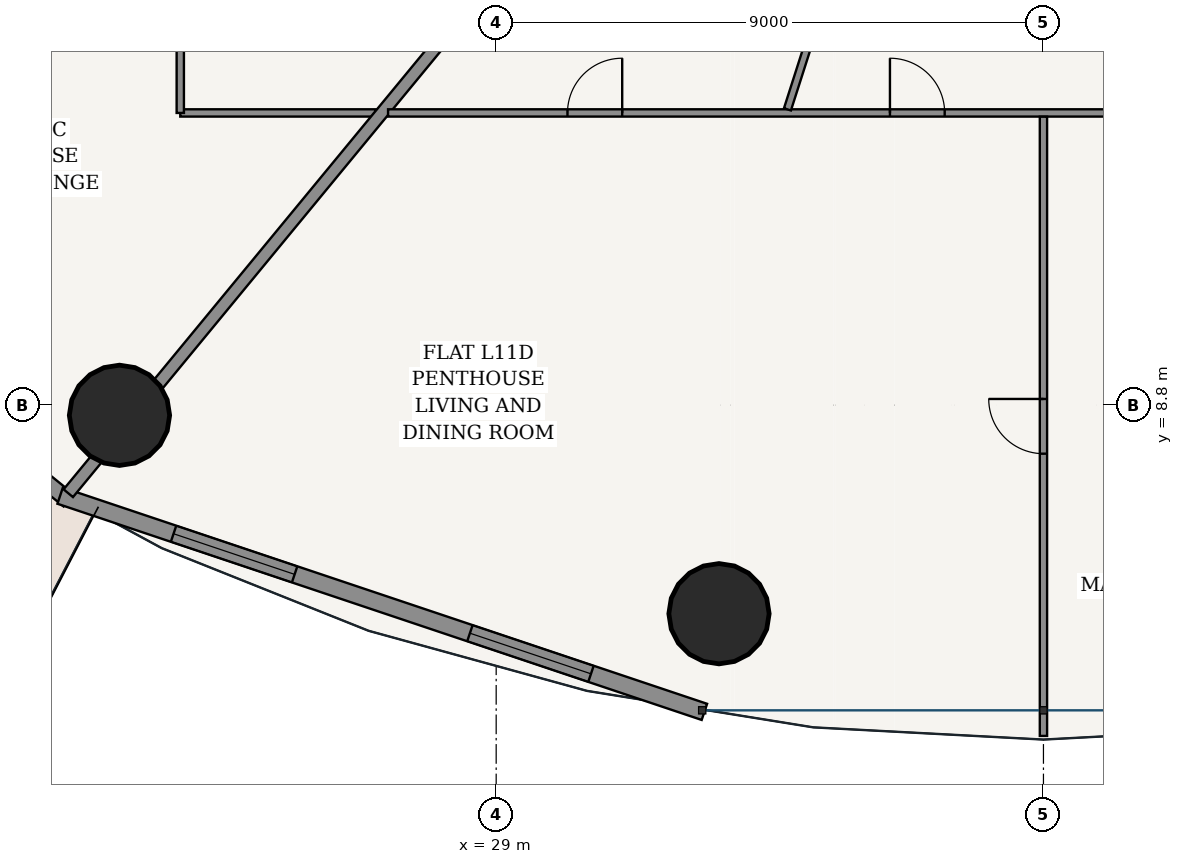
"""IFC4 building model, lengths in metres.
Left out: names, types, materials, properties, quantities, classifications, styles, units other than length and angle.
Written with IfcOpenShell. Run it as: python <this file> out.ifc"""

import sys

from ifc_helpers import new_model, si_unit, direction, frame, frame_2d, origin, origin_2d, place, context, subcontext, project, spatial, rectangle, hollow_circle, extrude, source, transform, mapped, element, fill, save


model = new_model("IFC4")
c1 = context("Model", 3, precision=1e-05, world=origin(), true_north=direction((-0.2419218956, 0.970295726276)))
c2 = subcontext(c1, "Body", "Model", "MODEL_VIEW")
j1 = project(units=[si_unit("LENGTHUNIT", "METRE"), si_unit("PLANEANGLEUNIT", "RADIAN")], contexts=[c1])
p1 = place(None, origin())
s1 = spatial("IfcSite", under=j1, at=p1, CompositionType="ELEMENT")
p2 = place(p1, origin())
s2 = spatial("IfcBuilding", under=s1, at=p2, CompositionType="ELEMENT")
p3 = place(p2, frame((0.0, 0.0, 45.6)))
s3 = spatial("IfcBuildingStorey", under=s2, at=p3, CompositionType="ELEMENT", Elevation=45.6)
for number, where, z_axis, x_axis in (
    (1, (22.805, 8.632, 0.0), (0.0, 0.0, 1.0), (1.0, 0.0, 0.0)),
    (2, (32.664, 5.37, 0.0), (0.0, 0.0, 1.0), (1.0, 0.0, 0.0)),
):
    element("IfcColumn", number, at=place(p3, frame(where, z_axis=z_axis, x_axis=x_axis)), inside=s3, PredefinedType="COLUMN", context=c2, shape_type="SweptSolid", body=[
        extrude(hollow_circle(Radius=0.825, WallThickness=0.05, at=origin_2d()), origin(), (0.0, 0.0, 1.0), 3.6),
    ])
p4 = place(p3, frame((13.85, 13.811, 0.0), z_axis=(0.0, 0.0, 1.0), x_axis=(0.777016782851, -0.629479879875, 0.0)))
e3 = element("IfcWall", 3, at=p4, inside=s3, PredefinedType="SOLIDWALL", context=c2, shape_type="SweptSolid", body=[
    extrude(rectangle(XDim=10.447, YDim=0.26, at=frame_2d((5.223, 0.0))), origin(), (0.0, 0.0, 1.0), 3.32),
])
p5 = place(p4, frame((4.548, 0.0, 0.0)))
e4 = element("IfcOpeningElement", 4, at=p5, cuts=e3, PredefinedType="OPENING", context=c2, shape_type="SweptSolid", body=[
    extrude(rectangle(XDim=1.35, YDim=2.2, at=frame_2d((0.675, 1.1))), frame((0.0, 0.14, 0.0), z_axis=(0.0, -1.0, 0.0), x_axis=(1.0, 0.0, 0.0)), (0.0, 0.0, 1.0), 0.28),
])
p6 = place(p3, frame((21.829, 7.311, 0.0), z_axis=(0.0, 0.0, 1.0), x_axis=(0.948047847546, -0.31812777113, 0.0)))
e5 = element("IfcWall", 5, at=p6, inside=s3, PredefinedType="SOLIDWALL", context=c2, shape_type="SweptSolid", body=[
    extrude(rectangle(XDim=11.175, YDim=0.28, at=frame_2d((5.588, 0.0))), origin(), (0.0, 0.0, 1.0), 3.32),
])
p7 = place(p6, frame((1.967, 0.0, 0.85)))
e6 = element("IfcOpeningElement", 6, at=p7, cuts=e5, PredefinedType="OPENING", context=c2, shape_type="SweptSolid", body=[
    extrude(rectangle(XDim=2.1, YDim=1.95, at=frame_2d((1.05, 0.975))), frame((0.0, 0.15, 0.0), z_axis=(0.0, -1.0, 0.0), x_axis=(1.0, 0.0, 0.0)), (0.0, 0.0, 1.0), 0.3),
])
p8 = place(p6, frame((7.108, 0.0, 0.85)))
e7 = element("IfcOpeningElement", 7, at=p8, cuts=e5, PredefinedType="OPENING", context=c2, shape_type="SweptSolid", body=[
    extrude(rectangle(XDim=2.1, YDim=1.95, at=frame_2d((1.05, 0.975))), frame((0.0, 0.15, 0.0), z_axis=(0.0, -1.0, 0.0), x_axis=(1.0, 0.0, 0.0)), (0.0, 0.0, 1.0), 0.3),
])
p9 = place(p3, frame((27.018, 13.605, 0.0), z_axis=(0.0, 0.0, 1.0), x_axis=(-1.0, 0.0, 0.0)))
e8 = element("IfcWall", 8, at=p9, inside=s3, PredefinedType="PARTITIONING", context=c2, shape_type="SweptSolid", body=[
    extrude(rectangle(XDim=3.213, YDim=0.12, at=frame_2d((1.606, 0.0))), origin(), (0.0, 0.0, 1.0), 2.688),
])
p10 = place(p3, frame((23.805, 13.605, 0.0), z_axis=(0.0, 0.0, 1.0), x_axis=(0.0, 1.0, 0.0)))
e9 = element("IfcWall", 9, at=p10, inside=s3, PredefinedType="PARTITIONING", context=c2, shape_type="SweptSolid", body=[
    extrude(rectangle(XDim=20.779, YDim=0.12, at=frame_2d((10.39, 0.0))), origin(), (0.0, 0.0, 1.0), 2.688),
])
p11 = place(p10, frame((2.425, 0.0, 0.0)))
e10 = element("IfcOpeningElement", 10, at=p11, cuts=e9, PredefinedType="OPENING", context=c2, shape_type="SweptSolid", body=[
    extrude(rectangle(XDim=0.9, YDim=2.15, at=frame_2d((0.45, 1.075))), frame((0.0, 0.07, 0.0), z_axis=(0.0, -1.0, 0.0), x_axis=(1.0, 0.0, 0.0)), (0.0, 0.0, 1.0), 0.14),
])
p12 = place(p10, frame((14.199, 0.0, 0.0)))
e11 = element("IfcOpeningElement", 11, at=p12, cuts=e9, PredefinedType="OPENING", context=c2, shape_type="SweptSolid", body=[
    extrude(rectangle(XDim=0.9, YDim=2.15, at=frame_2d((0.45, 1.075))), frame((0.0, 0.07, 0.0), z_axis=(0.0, -1.0, 0.0), x_axis=(1.0, 0.0, 0.0)), (0.0, 0.0, 1.0), 0.14),
])
p13 = place(p10, frame((17.908, 0.0, 0.0)))
e12 = element("IfcOpeningElement", 12, at=p13, cuts=e9, PredefinedType="OPENING", context=c2, shape_type="SweptSolid", body=[
    extrude(rectangle(XDim=0.9, YDim=2.15, at=frame_2d((0.45, 1.075))), frame((0.0, 0.07, 0.0), z_axis=(0.0, -1.0, 0.0), x_axis=(1.0, 0.0, 0.0)), (0.0, 0.0, 1.0), 0.14),
])
p14 = place(p3, frame((23.75, 19.084, 0.0), z_axis=(0.0, 0.0, 1.0), x_axis=(-0.879370672984, -0.476137815654, 0.0)))
e13 = element("IfcWall", 13, at=p14, inside=s3, PredefinedType="PARTITIONING", context=c2, shape_type="SweptSolid", body=[
    extrude(rectangle(XDim=11.094, YDim=0.12, at=frame_2d((5.547, 0.0))), origin(), (0.0, 0.0, 1.0), 2.688),
])
p15 = place(p14, frame((4.034, 0.0, 0.0)))
e14 = element("IfcOpeningElement", 14, at=p15, cuts=e13, PredefinedType="OPENING", context=c2, shape_type="SweptSolid", body=[
    extrude(rectangle(XDim=0.9, YDim=2.15, at=frame_2d((0.45, 1.075))), frame((0.0, 0.07, 0.0), z_axis=(0.0, -1.0, 0.0), x_axis=(1.0, 0.0, 0.0)), (0.0, 0.0, 1.0), 0.14),
])
p16 = place(p3, frame((29.396, 16.365, 0.0), z_axis=(0.0, 0.0, 1.0), x_axis=(-0.636186165667, -0.771535587393, 0.0)))
e15 = element("IfcWall", 15, at=p16, inside=s3, PredefinedType="PARTITIONING", context=c2, shape_type="SweptSolid", body=[
    extrude(rectangle(XDim=11.683, YDim=0.2, at=frame_2d((5.842, 0.0))), origin(), (0.0, 0.0, 1.0), 2.688),
])
p17 = place(p3, frame((52.195, 13.605, 0.0), z_axis=(0.0, 0.0, 1.0), x_axis=(-1.0, 0.0, 0.0)))
e16 = element("IfcWall", 16, at=p17, inside=s3, PredefinedType="PARTITIONING", context=c2, shape_type="SweptSolid", body=[
    extrude(rectangle(XDim=24.973, YDim=0.12, at=frame_2d((12.487, 0.0))), origin(), (0.0, 0.0, 1.0), 2.688),
])
p18 = place(p17, frame((3.841, 0.0, 0.0)))
e17 = element("IfcOpeningElement", 17, at=p18, cuts=e16, PredefinedType="OPENING", context=c2, shape_type="SweptSolid", body=[
    extrude(rectangle(XDim=0.9, YDim=2.15, at=frame_2d((0.45, 1.075))), frame((0.0, 0.07, 0.0), z_axis=(0.0, -1.0, 0.0), x_axis=(1.0, 0.0, 0.0)), (0.0, 0.0, 1.0), 0.14),
])
p19 = place(p17, frame((15.819, 0.0, 0.0)))
e18 = element("IfcOpeningElement", 18, at=p19, cuts=e16, PredefinedType="OPENING", context=c2, shape_type="SweptSolid", body=[
    extrude(rectangle(XDim=0.9, YDim=2.15, at=frame_2d((0.45, 1.075))), frame((0.0, 0.07, 0.0), z_axis=(0.0, -1.0, 0.0), x_axis=(1.0, 0.0, 0.0)), (0.0, 0.0, 1.0), 0.14),
])
p20 = place(p17, frame((21.123, 0.0, 0.0)))
e19 = element("IfcOpeningElement", 19, at=p20, cuts=e16, PredefinedType="OPENING", context=c2, shape_type="SweptSolid", body=[
    extrude(rectangle(XDim=0.9, YDim=2.15, at=frame_2d((0.45, 1.075))), frame((0.0, 0.07, 0.0), z_axis=(0.0, -1.0, 0.0), x_axis=(1.0, 0.0, 0.0)), (0.0, 0.0, 1.0), 0.14),
])
p21 = place(p3, frame((38.0, 13.543, 0.0), z_axis=(0.0, 0.0, 1.0), x_axis=(0.0, -1.0, 0.0)))
e20 = element("IfcWall", 20, at=p21, inside=s3, PredefinedType="PARTITIONING", context=c2, shape_type="SweptSolid", body=[
    extrude(rectangle(XDim=10.183, YDim=0.12, at=frame_2d((5.091, 0.0))), origin(), (0.0, 0.0, 1.0), 2.762),
])
p22 = place(p21, frame((4.642, 0.0, 0.0)))
e21 = element("IfcOpeningElement", 21, at=p22, cuts=e20, PredefinedType="OPENING", context=c2, shape_type="SweptSolid", body=[
    extrude(rectangle(XDim=0.9, YDim=2.15, at=frame_2d((0.45, 1.075))), frame((0.0, 0.07, 0.0), z_axis=(0.0, -1.0, 0.0), x_axis=(1.0, 0.0, 0.0)), (0.0, 0.0, 1.0), 0.14),
])
p23 = place(p3, frame((34.656, 16.365, 0.0), z_axis=(0.0, 0.0, 1.0), x_axis=(-0.305153630579, -0.952303135427, 0.0)))
e22 = element("IfcWall", 22, at=p23, inside=s3, PredefinedType="PARTITIONING", context=c2, shape_type="SweptSolid", body=[
    extrude(rectangle(XDim=2.836, YDim=0.12, at=frame_2d((1.418, 0.0))), origin(), (0.0, 0.0, 1.0), 3.32),
])
m1 = source(origin(), c2, "Body", "SweptSolid", [
    extrude(rectangle(XDim=2.1, YDim=1.95, at=frame_2d((1.05, 0.975))), frame((0.0, 0.03, 0.0), z_axis=(0.0, -1.0, 0.0), x_axis=(1.0, 0.0, 0.0)), (0.0, 0.0, 1.0), 0.06),
])
p24 = place(p7, origin())
e23 = element("IfcWindow", 23, at=p24, inside=s3, PartitioningType="SINGLE_PANEL", PredefinedType="WINDOW", context=c2, shape_type="MappedRepresentation", body=[
    mapped(m1, transform((0.0, 0.0, 0.0), scale=1.0)),
])
fill(e6, e23)
p25 = place(p8, origin())
e24 = element("IfcWindow", 24, at=p25, inside=s3, PartitioningType="SINGLE_PANEL", PredefinedType="WINDOW", context=c2, shape_type="MappedRepresentation", body=[
    mapped(m1, transform((0.0, 0.0, 0.0), scale=1.0)),
])
fill(e7, e24)
m2 = source(origin(), c2, "Body", "SweptSolid", [
    extrude(rectangle(XDim=0.9, YDim=2.15, at=frame_2d((0.45, 1.075))), frame((0.0, 0.025, 0.0), z_axis=(0.0, -1.0, 0.0), x_axis=(1.0, 0.0, 0.0)), (0.0, 0.0, 1.0), 0.05),
])
p26 = place(p22, frame((0.9, 0.0, 0.0), z_axis=(0.0, 0.0, 1.0), x_axis=(-1.0, 0.0, 0.0)))
e25 = element("IfcDoor", 25, at=p26, inside=s3, OperationType="SINGLE_SWING_RIGHT", PredefinedType="DOOR", context=c2, shape_type="MappedRepresentation", body=[
    mapped(m2, transform((0.0, 0.0, 0.0), scale=1.0)),
])
fill(e21, e25)
p27 = place(p19, frame((0.9, 0.0, 0.0), z_axis=(0.0, 0.0, 1.0), x_axis=(-1.0, 0.0, 0.0)))
e26 = element("IfcDoor", 26, at=p27, inside=s3, OperationType="SINGLE_SWING_LEFT", PredefinedType="DOOR", context=c2, shape_type="MappedRepresentation", body=[
    mapped(m2, transform((0.0, 0.0, 0.0), scale=1.0)),
])
fill(e18, e26)
p28 = place(p20, frame((0.9, 0.0, 0.0), z_axis=(0.0, 0.0, 1.0), x_axis=(-1.0, 0.0, 0.0)))
e27 = element("IfcDoor", 27, at=p28, inside=s3, OperationType="SINGLE_SWING_RIGHT", PredefinedType="DOOR", context=c2, shape_type="MappedRepresentation", body=[
    mapped(m2, transform((0.0, 0.0, 0.0), scale=1.0)),
])
fill(e19, e27)
save(model, sys.argv[1])
